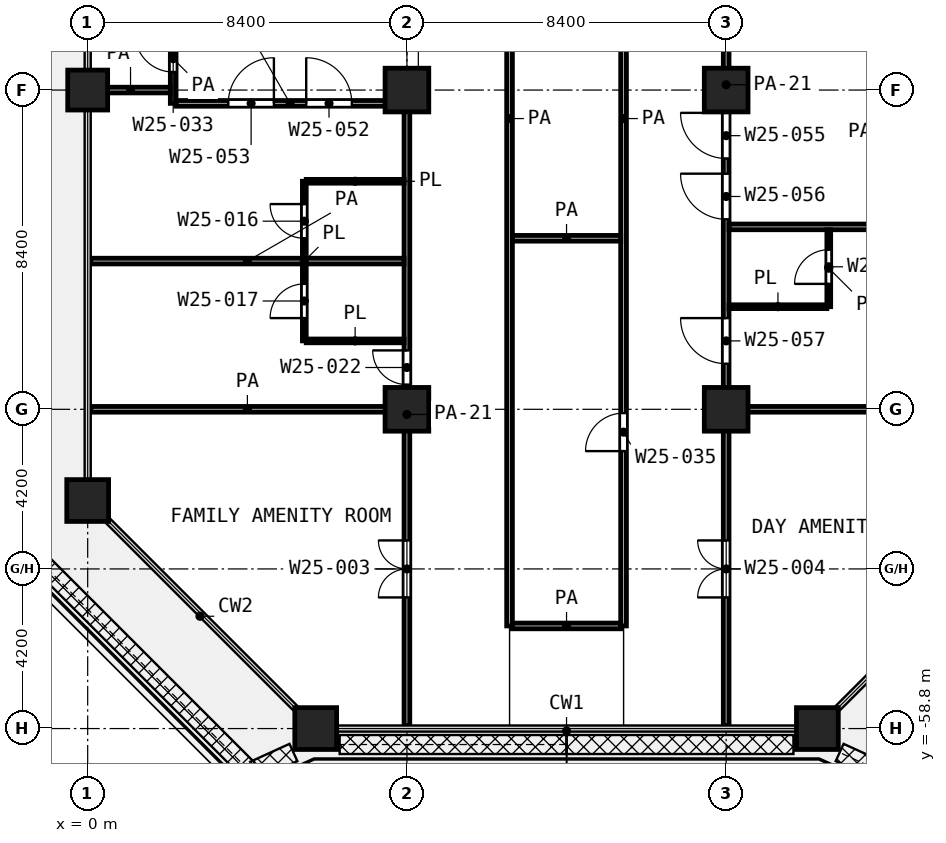
"""IFC4 building model, lengths in metres.
Left out: names, types, materials, properties, quantities, classifications, styles, units other than length and angle.
Written with IfcOpenShell. Run it as: python <this file> out.ifc"""

import sys

from ifc_helpers import new_model, si_unit, direction, frame, frame_2d, origin, origin_2d, place, context, subcontext, project, spatial, rectangle, extrude, element, fill, save


model = new_model("IFC4")
c1 = context("Model", 3, precision=1e-05, world=origin(), true_north=direction((0.0, 1.0)))
c2 = subcontext(c1, "Body", "Model", "MODEL_VIEW")
j1 = project(units=[si_unit("LENGTHUNIT", "METRE"), si_unit("PLANEANGLEUNIT", "RADIAN")], contexts=[c1])
p1 = place(None, origin())
s1 = spatial("IfcSite", under=j1, at=p1, CompositionType="ELEMENT")
p2 = place(p1, origin())
s2 = spatial("IfcBuilding", under=s1, at=p2, CompositionType="ELEMENT")
p3 = place(p2, frame((0.0, 0.0, 132.4)))
s3 = spatial("IfcBuildingStorey", under=s2, at=p3, CompositionType="ELEMENT", Elevation=132.4)
p4 = place(p3, frame((0.0, -42.0, 0.0), z_axis=(0.0, 0.0, 1.0), x_axis=(1.0, 0.0, 0.0)))
e1 = element("IfcColumn", 1, at=p4, inside=s3, PredefinedType="COLUMN", context=c2, shape_type="SweptSolid", body=[
    extrude(rectangle(XDim=1.05, YDim=1.05, at=origin_2d()), origin(), (0.0, 0.0, 1.0), 4.2),
])
for number, where, z_axis, x_axis in (
    (2, (8.4, -42.0, 0.0), (0.0, 0.0, 1.0), (1.0, 0.0, 0.0)),
    (3, (16.8, -42.0, 0.0), (0.0, 0.0, 1.0), (1.0, 0.0, 0.0)),
    (4, (8.4, -50.4, 0.0), (0.0, 0.0, 1.0), (1.0, 0.0, 0.0)),
    (5, (16.8, -50.4, 0.0), (0.0, 0.0, 1.0), (1.0, 0.0, 0.0)),
):
    element("IfcColumn", number, at=place(p3, frame(where, z_axis=z_axis, x_axis=x_axis)), inside=s3, PredefinedType="COLUMN", context=c2, shape_type="SweptSolid", body=[
        extrude(rectangle(XDim=1.15, YDim=1.15, at=origin_2d()), origin(), (0.0, 0.0, 1.0), 4.2),
    ])
for number, where, z_axis, x_axis in (
    (6, (0.0, -52.8, 0.0), (0.0, 0.0, 1.0), (1.0, 0.0, 0.0)),
    (7, (6.0, -58.8, 0.0), (0.0, 0.0, 1.0), (1.0, 0.0, 0.0)),
    (8, (19.2, -58.8, 0.0), (0.0, 0.0, 1.0), (1.0, 0.0, 0.0)),
):
    element("IfcColumn", number, at=place(p3, frame(where, z_axis=z_axis, x_axis=x_axis)), inside=s3, PredefinedType="COLUMN", context=c2, shape_type="SweptSolid", body=[
        extrude(rectangle(XDim=1.1, YDim=1.1, at=origin_2d()), origin(), (0.0, 0.0, 1.0), 4.2),
    ])
for number, where, z_axis, x_axis in (
    (9, (5.75, -48.6, 0.0), (0.0, 0.0, 1.0), (1.0, 0.0, 0.0)),
    (10, (16.875, -47.7, 0.0), (0.0, 0.0, 1.0), (1.0, 0.0, 0.0)),
    (11, (5.75, -44.4, 0.0), (0.0, 0.0, 1.0), (1.0, 0.0, 0.0)),
):
    element("IfcWall", number, at=place(p3, frame(where, z_axis=z_axis, x_axis=x_axis)), inside=s3, PredefinedType="PARTITIONING", context=c2, shape_type="SweptSolid", body=[
        extrude(rectangle(XDim=2.575, YDim=0.1, at=frame_2d((1.288, 0.0))), origin(), (0.0, 0.0, 1.0), 3.6),
    ])
p5 = place(p3, frame((5.7, -48.6, 0.0), z_axis=(0.0, 0.0, 1.0), x_axis=(0.0, 1.0, 0.0)))
e12 = element("IfcWall", 12, at=p5, inside=s3, PredefinedType="PARTITIONING", context=c2, shape_type="SweptSolid", body=[
    extrude(rectangle(XDim=4.2, YDim=0.1, at=frame_2d((2.1, 0.0))), origin(), (0.0, 0.0, 1.0), 3.6),
])
p6 = place(p5, frame((2.7, 0.0, 0.0)))
e13 = element("IfcOpeningElement", 13, at=p6, cuts=e12, PredefinedType="OPENING", context=c2, shape_type="SweptSolid", body=[
    extrude(rectangle(XDim=0.9, YDim=2.1, at=frame_2d((0.45, 1.05))), frame((0.0, 0.06, 0.0), z_axis=(0.0, -1.0, 0.0), x_axis=(1.0, 0.0, 0.0)), (0.0, 0.0, 1.0), 0.12),
])
p7 = place(p5, frame((0.6, 0.0, 0.0)))
e14 = element("IfcOpeningElement", 14, at=p7, cuts=e12, PredefinedType="OPENING", context=c2, shape_type="SweptSolid", body=[
    extrude(rectangle(XDim=0.9, YDim=2.1, at=frame_2d((0.45, 1.05))), frame((0.0, 0.06, 0.0), z_axis=(0.0, -1.0, 0.0), x_axis=(1.0, 0.0, 0.0)), (0.0, 0.0, 1.0), 0.12),
])
p8 = place(p3, frame((19.5, -47.7, 0.0), z_axis=(0.0, 0.0, 1.0), x_axis=(0.0, 1.0, 0.0)))
e15 = element("IfcWall", 15, at=p8, inside=s3, PredefinedType="PARTITIONING", context=c2, shape_type="SweptSolid", body=[
    extrude(rectangle(XDim=2.025, YDim=0.1, at=frame_2d((1.012, 0.0))), origin(), (0.0, 0.0, 1.0), 3.6),
])
p9 = place(p8, frame((0.6, 0.0, 0.0)))
e16 = element("IfcOpeningElement", 16, at=p9, cuts=e15, PredefinedType="OPENING", context=c2, shape_type="SweptSolid", body=[
    extrude(rectangle(XDim=0.9, YDim=2.1, at=frame_2d((0.45, 1.05))), frame((0.0, 0.06, 0.0), z_axis=(0.0, -1.0, 0.0), x_axis=(1.0, 0.0, 0.0)), (0.0, 0.0, 1.0), 0.12),
])
p10 = place(p3, frame((11.175, -56.1, 0.0), z_axis=(0.0, 0.0, 1.0), x_axis=(1.0, 0.0, 0.0)))
e17 = element("IfcWall", 17, at=p10, inside=s3, PredefinedType="PARTITIONING", context=c2, shape_type="SweptSolid", body=[
    extrude(rectangle(XDim=2.85, YDim=0.15, at=frame_2d((1.425, 0.0))), origin(), (0.0, 0.0, 1.0), 3.6),
])
p11 = place(p3, frame((0.08, -50.4, 0.0), z_axis=(0.0, 0.0, 1.0), x_axis=(1.0, 0.0, 0.0)))
e18 = element("IfcWall", 18, at=p11, inside=s3, PredefinedType="PARTITIONING", context=c2, shape_type="SweptSolid", body=[
    extrude(rectangle(XDim=8.245, YDim=0.15, at=frame_2d((4.123, 0.0))), origin(), (0.0, 0.0, 1.0), 3.6),
])
p12 = place(p3, frame((16.875, -50.4, 0.0), z_axis=(0.0, 0.0, 1.0), x_axis=(1.0, 0.0, 0.0)))
e19 = element("IfcWall", 19, at=p12, inside=s3, PredefinedType="PARTITIONING", context=c2, shape_type="SweptSolid", body=[
    extrude(rectangle(XDim=8.245, YDim=0.15, at=frame_2d((4.123, 0.0))), origin(), (0.0, 0.0, 1.0), 3.6),
])
p13 = place(p3, frame((0.08, -46.5, 0.0), z_axis=(0.0, 0.0, 1.0), x_axis=(1.0, 0.0, 0.0)))
e20 = element("IfcWall", 20, at=p13, inside=s3, PredefinedType="PARTITIONING", context=c2, shape_type="SweptSolid", body=[
    extrude(rectangle(XDim=8.245, YDim=0.15, at=frame_2d((4.123, 0.0))), origin(), (0.0, 0.0, 1.0), 3.6),
])
p14 = place(p3, frame((11.175, -45.9, 0.0), z_axis=(0.0, 0.0, 1.0), x_axis=(1.0, 0.0, 0.0)))
e21 = element("IfcWall", 21, at=p14, inside=s3, PredefinedType="PARTITIONING", context=c2, shape_type="SweptSolid", body=[
    extrude(rectangle(XDim=2.85, YDim=0.15, at=frame_2d((1.425, 0.0))), origin(), (0.0, 0.0, 1.0), 3.6),
])
p15 = place(p3, frame((16.875, -45.6, 0.0), z_axis=(0.0, 0.0, 1.0), x_axis=(1.0, 0.0, 0.0)))
e22 = element("IfcWall", 22, at=p15, inside=s3, PredefinedType="PARTITIONING", context=c2, shape_type="SweptSolid", body=[
    extrude(rectangle(XDim=8.245, YDim=0.15, at=frame_2d((4.123, 0.0))), origin(), (0.0, 0.0, 1.0), 3.6),
])
p16 = place(p3, frame((2.325, -42.35, 0.0), z_axis=(0.0, 0.0, 1.0), x_axis=(1.0, 0.0, 0.0)))
e23 = element("IfcWall", 23, at=p16, inside=s3, PredefinedType="PARTITIONING", context=c2, shape_type="SweptSolid", body=[
    extrude(rectangle(XDim=6.0, YDim=0.15, at=frame_2d((3.0, 0.0))), origin(), (0.0, 0.0, 1.0), 3.6),
])
p17 = place(p16, frame((3.425, 0.0, 0.0)))
e24 = element("IfcOpeningElement", 24, at=p17, cuts=e23, PredefinedType="OPENING", context=c2, shape_type="SweptSolid", body=[
    extrude(rectangle(XDim=1.2, YDim=2.1, at=frame_2d((0.6, 1.05))), frame((0.0, 0.085, 0.0), z_axis=(0.0, -1.0, 0.0), x_axis=(1.0, 0.0, 0.0)), (0.0, 0.0, 1.0), 0.17),
])
p18 = place(p16, frame((1.375, 0.0, 0.0)))
e25 = element("IfcOpeningElement", 25, at=p18, cuts=e23, PredefinedType="OPENING", context=c2, shape_type="SweptSolid", body=[
    extrude(rectangle(XDim=1.2, YDim=2.1, at=frame_2d((0.6, 1.05))), frame((0.0, 0.085, 0.0), z_axis=(0.0, -1.0, 0.0), x_axis=(1.0, 0.0, 0.0)), (0.0, 0.0, 1.0), 0.17),
])
p19 = place(p3, frame((0.08, -42.0, 0.0), z_axis=(0.0, 0.0, 1.0), x_axis=(1.0, 0.0, 0.0)))
e26 = element("IfcWall", 26, at=p19, inside=s3, PredefinedType="PARTITIONING", context=c2, shape_type="SweptSolid", body=[
    extrude(rectangle(XDim=2.095, YDim=0.15, at=frame_2d((1.047, 0.0))), origin(), (0.0, 0.0, 1.0), 3.6),
])
p20 = place(p3, frame((2.25, -42.35, 0.0), z_axis=(0.0, 0.0, 1.0), x_axis=(0.0, 1.0, 0.0)))
e27 = element("IfcWall", 27, at=p20, inside=s3, PredefinedType="PARTITIONING", context=c2, shape_type="SweptSolid", body=[
    extrude(rectangle(XDim=2.35, YDim=0.15, at=frame_2d((1.175, 0.0))), origin(), (0.0, 0.0, 1.0), 3.6),
])
p21 = place(p20, frame((0.825, 0.0, 0.0)))
e28 = element("IfcOpeningElement", 28, at=p21, cuts=e27, PredefinedType="OPENING", context=c2, shape_type="SweptSolid", body=[
    extrude(rectangle(XDim=1.0, YDim=2.1, at=frame_2d((0.5, 1.05))), frame((0.0, 0.085, 0.0), z_axis=(0.0, -1.0, 0.0), x_axis=(1.0, 0.0, 0.0)), (0.0, 0.0, 1.0), 0.17),
])
p22 = place(p3, frame((8.4, -58.72, 0.0), z_axis=(0.0, 0.0, 1.0), x_axis=(0.0, 1.0, 0.0)))
e29 = element("IfcWall", 29, at=p22, inside=s3, PredefinedType="PARTITIONING", context=c2, shape_type="SweptSolid", body=[
    extrude(rectangle(XDim=16.37, YDim=0.15, at=frame_2d((8.185, 0.0))), origin(), (0.0, 0.0, 1.0), 2.7),
])
p23 = place(p22, frame((8.97, 0.0, 0.0)))
e30 = element("IfcOpeningElement", 30, at=p23, cuts=e29, PredefinedType="OPENING", context=c2, shape_type="SweptSolid", body=[
    extrude(rectangle(XDim=0.9, YDim=2.1, at=frame_2d((0.45, 1.05))), frame((0.0, 0.085, 0.0), z_axis=(0.0, -1.0, 0.0), x_axis=(1.0, 0.0, 0.0)), (0.0, 0.0, 1.0), 0.17),
])
p24 = place(p22, frame((3.37, 0.0, 0.0)))
e31 = element("IfcOpeningElement", 31, at=p24, cuts=e29, PredefinedType="OPENING", context=c2, shape_type="SweptSolid", body=[
    extrude(rectangle(XDim=1.5, YDim=2.1, at=frame_2d((0.75, 1.05))), frame((0.0, 0.085, 0.0), z_axis=(0.0, -1.0, 0.0), x_axis=(1.0, 0.0, 0.0)), (0.0, 0.0, 1.0), 0.17),
])
p25 = place(p3, frame((11.1, -56.1, 0.0), z_axis=(0.0, 0.0, 1.0), x_axis=(0.0, 1.0, 0.0)))
e32 = element("IfcWall", 32, at=p25, inside=s3, PredefinedType="PARTITIONING", context=c2, shape_type="SweptSolid", body=[
    extrude(rectangle(XDim=26.7, YDim=0.15, at=frame_2d((13.35, 0.0))), origin(), (0.0, 0.0, 1.0), 3.6),
])
p26 = place(p3, frame((14.1, -56.1, 0.0), z_axis=(0.0, 0.0, 1.0), x_axis=(0.0, 1.0, 0.0)))
e33 = element("IfcWall", 33, at=p26, inside=s3, PredefinedType="PARTITIONING", context=c2, shape_type="SweptSolid", body=[
    extrude(rectangle(XDim=26.7, YDim=0.15, at=frame_2d((13.35, 0.0))), origin(), (0.0, 0.0, 1.0), 3.6),
])
p27 = place(p26, frame((17.95, 0.0, 0.0)))
e34 = element("IfcOpeningElement", 34, at=p27, cuts=e33, PredefinedType="OPENING", context=c2, shape_type="SweptSolid", body=[
    extrude(rectangle(XDim=1.0, YDim=2.1, at=frame_2d((0.5, 1.05))), frame((0.0, 0.085, 0.0), z_axis=(0.0, -1.0, 0.0), x_axis=(1.0, 0.0, 0.0)), (0.0, 0.0, 1.0), 0.17),
])
p28 = place(p26, frame((4.6, 0.0, 0.0)))
e35 = element("IfcOpeningElement", 35, at=p28, cuts=e33, PredefinedType="OPENING", context=c2, shape_type="SweptSolid", body=[
    extrude(rectangle(XDim=1.0, YDim=2.1, at=frame_2d((0.5, 1.05))), frame((0.0, 0.085, 0.0), z_axis=(0.0, -1.0, 0.0), x_axis=(1.0, 0.0, 0.0)), (0.0, 0.0, 1.0), 0.17),
])
p29 = place(p3, frame((16.8, -58.72, 0.0), z_axis=(0.0, 0.0, 1.0), x_axis=(0.0, 1.0, 0.0)))
e36 = element("IfcWall", 36, at=p29, inside=s3, PredefinedType="PARTITIONING", context=c2, shape_type="SweptSolid", body=[
    extrude(rectangle(XDim=33.72, YDim=0.15, at=frame_2d((16.86, 0.0))), origin(), (0.0, 0.0, 1.0), 2.7),
])
p30 = place(p29, frame((26.72, 0.0, 0.0)))
e37 = element("IfcOpeningElement", 37, at=p30, cuts=e36, PredefinedType="OPENING", context=c2, shape_type="SweptSolid", body=[
    extrude(rectangle(XDim=1.0, YDim=2.1, at=frame_2d((0.5, 1.05))), frame((0.0, 0.085, 0.0), z_axis=(0.0, -1.0, 0.0), x_axis=(1.0, 0.0, 0.0)), (0.0, 0.0, 1.0), 0.17),
])
p31 = place(p29, frame((23.32, 0.0, 0.0)))
e38 = element("IfcOpeningElement", 38, at=p31, cuts=e36, PredefinedType="OPENING", context=c2, shape_type="SweptSolid", body=[
    extrude(rectangle(XDim=1.2, YDim=2.1, at=frame_2d((0.6, 1.05))), frame((0.0, 0.085, 0.0), z_axis=(0.0, -1.0, 0.0), x_axis=(1.0, 0.0, 0.0)), (0.0, 0.0, 1.0), 0.17),
])
p32 = place(p29, frame((14.92, 0.0, 0.0)))
e39 = element("IfcOpeningElement", 39, at=p32, cuts=e36, PredefinedType="OPENING", context=c2, shape_type="SweptSolid", body=[
    extrude(rectangle(XDim=1.2, YDim=2.1, at=frame_2d((0.6, 1.05))), frame((0.0, 0.085, 0.0), z_axis=(0.0, -1.0, 0.0), x_axis=(1.0, 0.0, 0.0)), (0.0, 0.0, 1.0), 0.17),
])
p33 = place(p29, frame((13.32, 0.0, 0.0)))
e40 = element("IfcOpeningElement", 40, at=p33, cuts=e36, PredefinedType="OPENING", context=c2, shape_type="SweptSolid", body=[
    extrude(rectangle(XDim=1.2, YDim=2.1, at=frame_2d((0.6, 1.05))), frame((0.0, 0.085, 0.0), z_axis=(0.0, -1.0, 0.0), x_axis=(1.0, 0.0, 0.0)), (0.0, 0.0, 1.0), 0.17),
])
p34 = place(p29, frame((9.52, 0.0, 0.0)))
e41 = element("IfcOpeningElement", 41, at=p34, cuts=e36, PredefinedType="OPENING", context=c2, shape_type="SweptSolid", body=[
    extrude(rectangle(XDim=1.2, YDim=2.1, at=frame_2d((0.6, 1.05))), frame((0.0, 0.085, 0.0), z_axis=(0.0, -1.0, 0.0), x_axis=(1.0, 0.0, 0.0)), (0.0, 0.0, 1.0), 0.17),
])
p35 = place(p29, frame((3.37, 0.0, 0.0)))
e42 = element("IfcOpeningElement", 42, at=p35, cuts=e36, PredefinedType="OPENING", context=c2, shape_type="SweptSolid", body=[
    extrude(rectangle(XDim=1.5, YDim=2.1, at=frame_2d((0.75, 1.05))), frame((0.0, 0.085, 0.0), z_axis=(0.0, -1.0, 0.0), x_axis=(1.0, 0.0, 0.0)), (0.0, 0.0, 1.0), 0.17),
])
p36 = place(p21, origin())
e43 = element("IfcDoor", 43, at=p36, inside=s3, OperationType="SINGLE_SWING_RIGHT", PredefinedType="DOOR", context=c2, shape_type="SweptSolid", body=[
    extrude(rectangle(XDim=1.0, YDim=2.1, at=frame_2d((0.5, 1.05))), frame((0.0, 0.025, 0.0), z_axis=(0.0, -1.0, 0.0), x_axis=(1.0, 0.0, 0.0)), (0.0, 0.0, 1.0), 0.05),
])
fill(e28, e43)
p37 = place(p17, origin())
e44 = element("IfcDoor", 44, at=p37, inside=s3, OperationType="SINGLE_SWING_LEFT", PredefinedType="DOOR", context=c2, shape_type="SweptSolid", body=[
    extrude(rectangle(XDim=1.2, YDim=2.1, at=frame_2d((0.6, 1.05))), frame((0.0, 0.025, 0.0), z_axis=(0.0, -1.0, 0.0), x_axis=(1.0, 0.0, 0.0)), (0.0, 0.0, 1.0), 0.05),
])
fill(e24, e44)
p38 = place(p18, origin())
e45 = element("IfcDoor", 45, at=p38, inside=s3, OperationType="SINGLE_SWING_RIGHT", PredefinedType="DOOR", context=c2, shape_type="SweptSolid", body=[
    extrude(rectangle(XDim=1.2, YDim=2.1, at=frame_2d((0.6, 1.05))), frame((0.0, 0.025, 0.0), z_axis=(0.0, -1.0, 0.0), x_axis=(1.0, 0.0, 0.0)), (0.0, 0.0, 1.0), 0.05),
])
fill(e25, e45)
p39 = place(p6, origin())
e46 = element("IfcDoor", 46, at=p39, inside=s3, OperationType="SINGLE_SWING_RIGHT", PredefinedType="DOOR", context=c2, shape_type="SweptSolid", body=[
    extrude(rectangle(XDim=0.9, YDim=2.1, at=frame_2d((0.45, 1.05))), frame((0.0, 0.025, 0.0), z_axis=(0.0, -1.0, 0.0), x_axis=(1.0, 0.0, 0.0)), (0.0, 0.0, 1.0), 0.05),
])
fill(e13, e46)
p40 = place(p23, origin())
e47 = element("IfcDoor", 47, at=p40, inside=s3, OperationType="SINGLE_SWING_RIGHT", PredefinedType="DOOR", context=c2, shape_type="SweptSolid", body=[
    extrude(rectangle(XDim=0.9, YDim=2.1, at=frame_2d((0.45, 1.05))), frame((0.0, 0.025, 0.0), z_axis=(0.0, -1.0, 0.0), x_axis=(1.0, 0.0, 0.0)), (0.0, 0.0, 1.0), 0.05),
])
fill(e30, e47)
p41 = place(p7, origin())
e48 = element("IfcDoor", 48, at=p41, inside=s3, OperationType="SINGLE_SWING_LEFT", PredefinedType="DOOR", context=c2, shape_type="SweptSolid", body=[
    extrude(rectangle(XDim=0.9, YDim=2.1, at=frame_2d((0.45, 1.05))), frame((0.0, 0.025, 0.0), z_axis=(0.0, -1.0, 0.0), x_axis=(1.0, 0.0, 0.0)), (0.0, 0.0, 1.0), 0.05),
])
fill(e14, e48)
p42 = place(p24, origin())
e49 = element("IfcDoor", 49, at=p42, inside=s3, OperationType="DOUBLE_DOOR_SINGLE_SWING", PredefinedType="DOOR", context=c2, shape_type="SweptSolid", body=[
    extrude(rectangle(XDim=1.5, YDim=2.1, at=frame_2d((0.75, 1.05))), frame((0.0, 0.025, 0.0), z_axis=(0.0, -1.0, 0.0), x_axis=(1.0, 0.0, 0.0)), (0.0, 0.0, 1.0), 0.05),
])
fill(e31, e49)
p43 = place(p28, origin())
e50 = element("IfcDoor", 50, at=p43, inside=s3, OperationType="SINGLE_SWING_LEFT", PredefinedType="DOOR", context=c2, shape_type="SweptSolid", body=[
    extrude(rectangle(XDim=1.0, YDim=2.1, at=frame_2d((0.5, 1.05))), frame((0.0, 0.025, 0.0), z_axis=(0.0, -1.0, 0.0), x_axis=(1.0, 0.0, 0.0)), (0.0, 0.0, 1.0), 0.05),
])
fill(e35, e50)
p44 = place(p32, origin())
e51 = element("IfcDoor", 51, at=p44, inside=s3, OperationType="SINGLE_SWING_RIGHT", PredefinedType="DOOR", context=c2, shape_type="SweptSolid", body=[
    extrude(rectangle(XDim=1.2, YDim=2.1, at=frame_2d((0.6, 1.05))), frame((0.0, 0.025, 0.0), z_axis=(0.0, -1.0, 0.0), x_axis=(1.0, 0.0, 0.0)), (0.0, 0.0, 1.0), 0.05),
])
fill(e39, e51)
p45 = place(p33, origin())
e52 = element("IfcDoor", 52, at=p45, inside=s3, OperationType="SINGLE_SWING_RIGHT", PredefinedType="DOOR", context=c2, shape_type="SweptSolid", body=[
    extrude(rectangle(XDim=1.2, YDim=2.1, at=frame_2d((0.6, 1.05))), frame((0.0, 0.025, 0.0), z_axis=(0.0, -1.0, 0.0), x_axis=(1.0, 0.0, 0.0)), (0.0, 0.0, 1.0), 0.05),
])
fill(e40, e52)
p46 = place(p34, origin())
e53 = element("IfcDoor", 53, at=p46, inside=s3, OperationType="SINGLE_SWING_RIGHT", PredefinedType="DOOR", context=c2, shape_type="SweptSolid", body=[
    extrude(rectangle(XDim=1.2, YDim=2.1, at=frame_2d((0.6, 1.05))), frame((0.0, 0.025, 0.0), z_axis=(0.0, -1.0, 0.0), x_axis=(1.0, 0.0, 0.0)), (0.0, 0.0, 1.0), 0.05),
])
fill(e41, e53)
p47 = place(p9, origin())
e54 = element("IfcDoor", 54, at=p47, inside=s3, OperationType="SINGLE_SWING_LEFT", PredefinedType="DOOR", context=c2, shape_type="SweptSolid", body=[
    extrude(rectangle(XDim=0.9, YDim=2.1, at=frame_2d((0.45, 1.05))), frame((0.0, 0.025, 0.0), z_axis=(0.0, -1.0, 0.0), x_axis=(1.0, 0.0, 0.0)), (0.0, 0.0, 1.0), 0.05),
])
fill(e16, e54)
p48 = place(p35, origin())
e55 = element("IfcDoor", 55, at=p48, inside=s3, OperationType="DOUBLE_DOOR_SINGLE_SWING", PredefinedType="DOOR", context=c2, shape_type="SweptSolid", body=[
    extrude(rectangle(XDim=1.5, YDim=2.1, at=frame_2d((0.75, 1.05))), frame((0.0, 0.025, 0.0), z_axis=(0.0, -1.0, 0.0), x_axis=(1.0, 0.0, 0.0)), (0.0, 0.0, 1.0), 0.05),
])
fill(e42, e55)
save(model, sys.argv[1])
